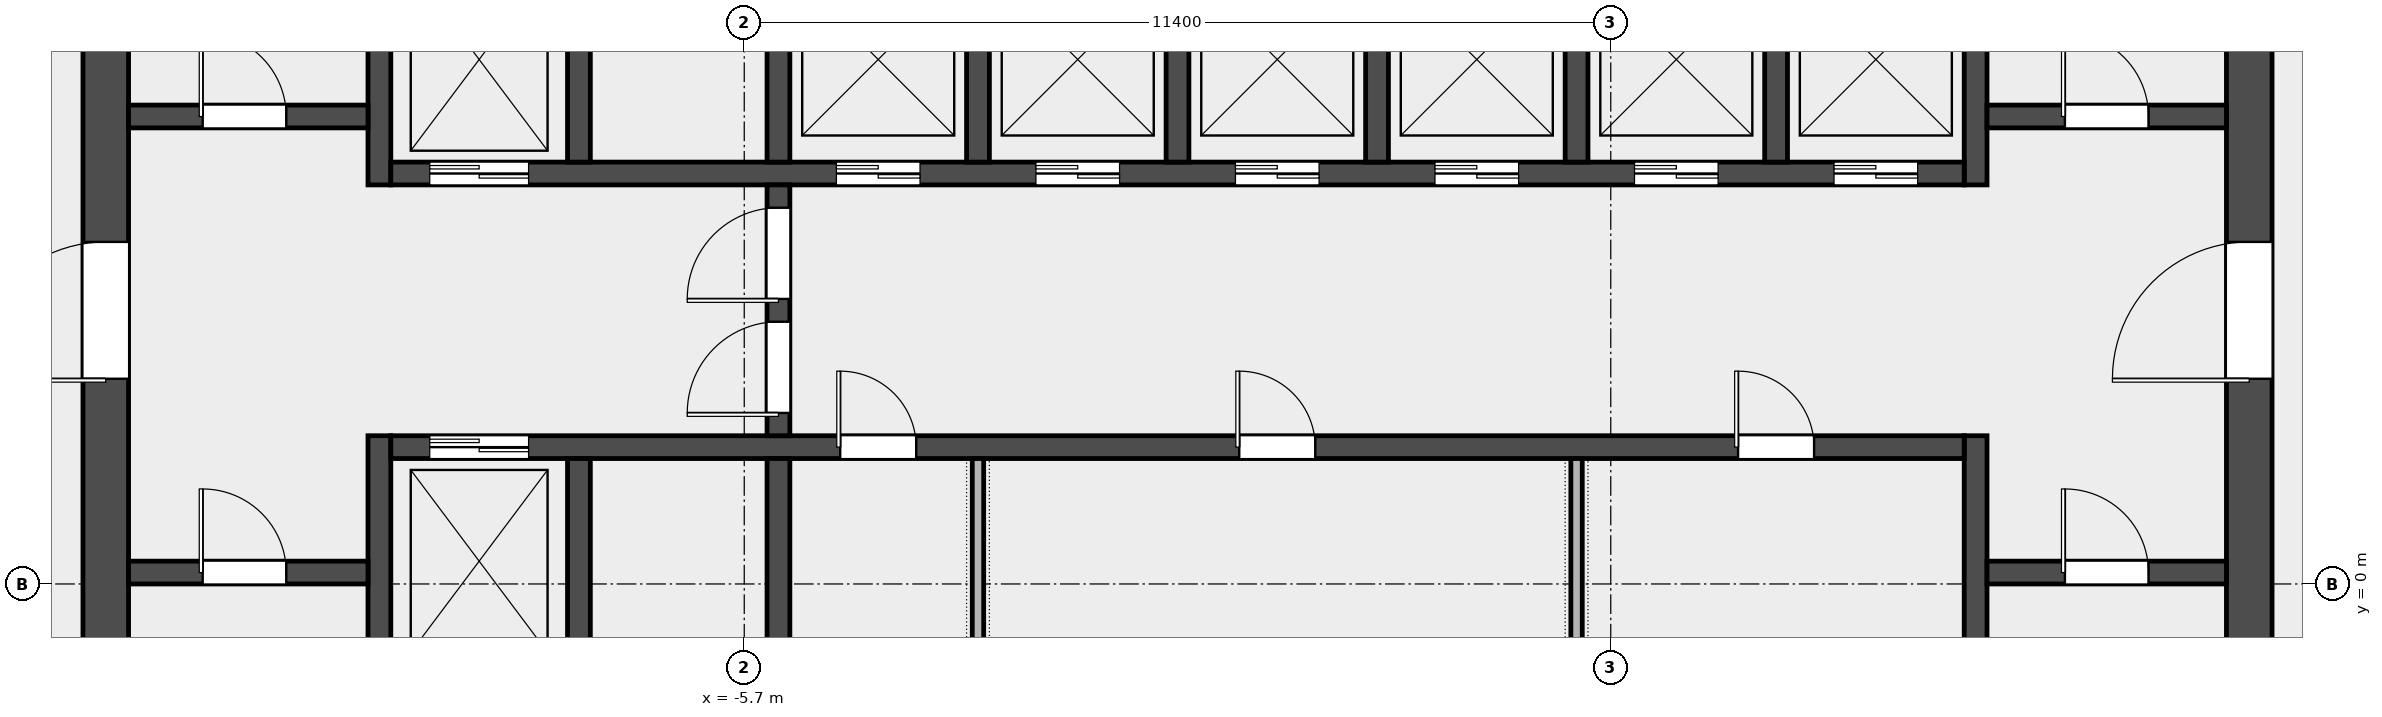
"""IFC4 building model, lengths in metres.
Left out: names, types, materials, properties, quantities, classifications, styles, units other than length and angle.
Written with IfcOpenShell. Run it as: python <this file> out.ifc"""

import sys

from ifc_helpers import new_model, si_unit, direction, frame, frame_2d, origin, place, context, subcontext, project, spatial, rectangle, extrude, element, fill, save


model = new_model("IFC4")
c1 = context("Model", 3, precision=1e-05, world=origin(), true_north=direction((0.0, 1.0)))
c2 = subcontext(c1, "Body", "Model", "MODEL_VIEW")
j1 = project(units=[si_unit("LENGTHUNIT", "METRE"), si_unit("PLANEANGLEUNIT", "RADIAN")], contexts=[c1])
p1 = place(None, origin())
s1 = spatial("IfcSite", under=j1, at=p1, CompositionType="ELEMENT")
p2 = place(p1, origin())
s2 = spatial("IfcBuilding", under=s1, at=p2, CompositionType="ELEMENT")
p3 = place(p2, frame((0.0, 0.0, 279.4)))
s3 = spatial("IfcBuildingStorey", under=s2, at=p3, CompositionType="ELEMENT", Elevation=279.4)
p4 = place(p3, frame((-14.1, -6.6, 0.0), z_axis=(0.0, 0.0, 1.0), x_axis=(0.0, 1.0, 0.0)))
e1 = element("IfcWall", 1, at=p4, inside=s3, PredefinedType="SHEAR", context=c2, shape_type="SweptSolid", body=[
    extrude(rectangle(XDim=19.5, YDim=0.6, at=frame_2d((9.75, 0.0))), origin(), (0.0, 0.0, 1.0), 3.7),
])
p5 = place(p4, frame((9.3, 0.0, 0.0)))
e2 = element("IfcOpeningElement", 2, at=p5, cuts=e1, PredefinedType="OPENING", context=c2, shape_type="SweptSolid", body=[
    extrude(rectangle(XDim=1.8, YDim=2.1, at=frame_2d((0.9, 1.05))), frame((0.0, 0.312, 0.0), z_axis=(0.0, -1.0, 0.0), x_axis=(1.0, 0.0, 0.0)), (0.0, 0.0, 1.0), 0.624),
])
p6 = place(p3, frame((14.1, -6.6, 0.0), z_axis=(0.0, 0.0, 1.0), x_axis=(0.0, 1.0, 0.0)))
e3 = element("IfcWall", 3, at=p6, inside=s3, PredefinedType="SHEAR", context=c2, shape_type="SweptSolid", body=[
    extrude(rectangle(XDim=19.5, YDim=0.6, at=frame_2d((9.75, 0.0))), origin(), (0.0, 0.0, 1.0), 3.7),
])
p7 = place(p6, frame((9.3, 0.0, 0.0)))
e4 = element("IfcOpeningElement", 4, at=p7, cuts=e3, PredefinedType="OPENING", context=c2, shape_type="SweptSolid", body=[
    extrude(rectangle(XDim=1.8, YDim=2.1, at=frame_2d((0.9, 1.05))), frame((0.0, 0.312, 0.0), z_axis=(0.0, -1.0, 0.0), x_axis=(1.0, 0.0, 0.0)), (0.0, 0.0, 1.0), 0.624),
])
p8 = place(p3, frame((-10.5, -6.6, 0.0), z_axis=(0.0, 0.0, 1.0), x_axis=(0.0, 1.0, 0.0)))
e5 = element("IfcWall", 5, at=p8, inside=s3, PredefinedType="SHEAR", context=c2, shape_type="SweptSolid", body=[
    extrude(rectangle(XDim=8.55, YDim=0.3, at=frame_2d((4.275, 0.0))), origin(), (0.0, 0.0, 1.0), 3.7),
])
p9 = place(p3, frame((-10.5, 5.25, 0.0), z_axis=(0.0, 0.0, 1.0), x_axis=(0.0, 1.0, 0.0)))
e6 = element("IfcWall", 6, at=p9, inside=s3, PredefinedType="SHEAR", context=c2, shape_type="SweptSolid", body=[
    extrude(rectangle(XDim=7.65, YDim=0.3, at=frame_2d((3.825, 0.0))), origin(), (0.0, 0.0, 1.0), 3.7),
])
p10 = place(p3, frame((10.5, -6.6, 0.0), z_axis=(0.0, 0.0, 1.0), x_axis=(0.0, 1.0, 0.0)))
e7 = element("IfcWall", 7, at=p10, inside=s3, PredefinedType="SHEAR", context=c2, shape_type="SweptSolid", body=[
    extrude(rectangle(XDim=8.55, YDim=0.3, at=frame_2d((4.275, 0.0))), origin(), (0.0, 0.0, 1.0), 3.7),
])
p11 = place(p3, frame((10.5, 5.25, 0.0), z_axis=(0.0, 0.0, 1.0), x_axis=(0.0, 1.0, 0.0)))
e8 = element("IfcWall", 8, at=p11, inside=s3, PredefinedType="SHEAR", context=c2, shape_type="SweptSolid", body=[
    extrude(rectangle(XDim=7.65, YDim=0.3, at=frame_2d((3.825, 0.0))), origin(), (0.0, 0.0, 1.0), 3.7),
])
p12 = place(p3, frame((-13.8, 0.15, 0.0), z_axis=(0.0, 0.0, 1.0), x_axis=(1.0, 0.0, 0.0)))
e9 = element("IfcWall", 9, at=p12, inside=s3, PredefinedType="SOLIDWALL", context=c2, shape_type="SweptSolid", body=[
    extrude(rectangle(XDim=3.15, YDim=0.3, at=frame_2d((1.575, 0.0))), origin(), (0.0, 0.0, 1.0), 3.7),
])
p13 = place(p12, frame((0.975, 0.0, 0.0)))
e10 = element("IfcOpeningElement", 10, at=p13, cuts=e9, PredefinedType="OPENING", context=c2, shape_type="SweptSolid", body=[
    extrude(rectangle(XDim=1.1, YDim=2.1, at=frame_2d((0.55, 1.05))), frame((0.0, 0.162, 0.0), z_axis=(0.0, -1.0, 0.0), x_axis=(1.0, 0.0, 0.0)), (0.0, 0.0, 1.0), 0.324),
])
p14 = place(p3, frame((-13.8, 6.15, 0.0), z_axis=(0.0, 0.0, 1.0), x_axis=(1.0, 0.0, 0.0)))
e11 = element("IfcWall", 11, at=p14, inside=s3, PredefinedType="SOLIDWALL", context=c2, shape_type="SweptSolid", body=[
    extrude(rectangle(XDim=3.15, YDim=0.3, at=frame_2d((1.575, 0.0))), origin(), (0.0, 0.0, 1.0), 3.7),
])
p15 = place(p14, frame((0.975, 0.0, 0.0)))
e12 = element("IfcOpeningElement", 12, at=p15, cuts=e11, PredefinedType="OPENING", context=c2, shape_type="SweptSolid", body=[
    extrude(rectangle(XDim=1.1, YDim=2.1, at=frame_2d((0.55, 1.05))), frame((0.0, 0.162, 0.0), z_axis=(0.0, -1.0, 0.0), x_axis=(1.0, 0.0, 0.0)), (0.0, 0.0, 1.0), 0.324),
])
p16 = place(p3, frame((10.65, 0.15, 0.0), z_axis=(0.0, 0.0, 1.0), x_axis=(1.0, 0.0, 0.0)))
e13 = element("IfcWall", 13, at=p16, inside=s3, PredefinedType="SOLIDWALL", context=c2, shape_type="SweptSolid", body=[
    extrude(rectangle(XDim=3.15, YDim=0.3, at=frame_2d((1.575, 0.0))), origin(), (0.0, 0.0, 1.0), 3.7),
])
p17 = place(p16, frame((1.025, 0.0, 0.0)))
e14 = element("IfcOpeningElement", 14, at=p17, cuts=e13, PredefinedType="OPENING", context=c2, shape_type="SweptSolid", body=[
    extrude(rectangle(XDim=1.1, YDim=2.1, at=frame_2d((0.55, 1.05))), frame((0.0, 0.162, 0.0), z_axis=(0.0, -1.0, 0.0), x_axis=(1.0, 0.0, 0.0)), (0.0, 0.0, 1.0), 0.324),
])
p18 = place(p3, frame((10.65, 6.15, 0.0), z_axis=(0.0, 0.0, 1.0), x_axis=(1.0, 0.0, 0.0)))
e15 = element("IfcWall", 15, at=p18, inside=s3, PredefinedType="SOLIDWALL", context=c2, shape_type="SweptSolid", body=[
    extrude(rectangle(XDim=3.15, YDim=0.3, at=frame_2d((1.575, 0.0))), origin(), (0.0, 0.0, 1.0), 3.7),
])
p19 = place(p18, frame((1.025, 0.0, 0.0)))
e16 = element("IfcOpeningElement", 16, at=p19, cuts=e15, PredefinedType="OPENING", context=c2, shape_type="SweptSolid", body=[
    extrude(rectangle(XDim=1.1, YDim=2.1, at=frame_2d((0.55, 1.05))), frame((0.0, 0.162, 0.0), z_axis=(0.0, -1.0, 0.0), x_axis=(1.0, 0.0, 0.0)), (0.0, 0.0, 1.0), 0.324),
])
p20 = place(p3, frame((-10.35, 1.8, 0.0), z_axis=(0.0, 0.0, 1.0), x_axis=(1.0, 0.0, 0.0)))
e17 = element("IfcWall", 17, at=p20, inside=s3, PredefinedType="SOLIDWALL", context=c2, shape_type="SweptSolid", body=[
    extrude(rectangle(XDim=20.7, YDim=0.3, at=frame_2d((10.35, 0.0))), origin(), (0.0, 0.0, 1.0), 3.7),
])
p21 = place(p20, frame((0.512, 0.0, 0.0)))
e18 = element("IfcOpeningElement", 18, at=p21, cuts=e17, PredefinedType="OPENING", context=c2, shape_type="SweptSolid", body=[
    extrude(rectangle(XDim=1.3, YDim=2.1, at=frame_2d((0.65, 1.05))), frame((0.0, 0.162, 0.0), z_axis=(0.0, -1.0, 0.0), x_axis=(1.0, 0.0, 0.0)), (0.0, 0.0, 1.0), 0.324),
])
p22 = place(p20, frame((5.913, 0.0, 0.0)))
e19 = element("IfcOpeningElement", 19, at=p22, cuts=e17, PredefinedType="OPENING", context=c2, shape_type="SweptSolid", body=[
    extrude(rectangle(XDim=1.0, YDim=2.1, at=frame_2d((0.5, 1.05))), frame((0.0, 0.162, 0.0), z_axis=(0.0, -1.0, 0.0), x_axis=(1.0, 0.0, 0.0)), (0.0, 0.0, 1.0), 0.324),
])
p23 = place(p20, frame((11.163, 0.0, 0.0)))
e20 = element("IfcOpeningElement", 20, at=p23, cuts=e17, PredefinedType="OPENING", context=c2, shape_type="SweptSolid", body=[
    extrude(rectangle(XDim=1.0, YDim=2.1, at=frame_2d((0.5, 1.05))), frame((0.0, 0.162, 0.0), z_axis=(0.0, -1.0, 0.0), x_axis=(1.0, 0.0, 0.0)), (0.0, 0.0, 1.0), 0.324),
])
p24 = place(p20, frame((17.725, 0.0, 0.0)))
e21 = element("IfcOpeningElement", 21, at=p24, cuts=e17, PredefinedType="OPENING", context=c2, shape_type="SweptSolid", body=[
    extrude(rectangle(XDim=1.0, YDim=2.1, at=frame_2d((0.5, 1.05))), frame((0.0, 0.162, 0.0), z_axis=(0.0, -1.0, 0.0), x_axis=(1.0, 0.0, 0.0)), (0.0, 0.0, 1.0), 0.324),
])
p25 = place(p3, frame((-10.35, 5.4, 0.0), z_axis=(0.0, 0.0, 1.0), x_axis=(1.0, 0.0, 0.0)))
e22 = element("IfcWall", 22, at=p25, inside=s3, PredefinedType="SOLIDWALL", context=c2, shape_type="SweptSolid", body=[
    extrude(rectangle(XDim=20.7, YDim=0.3, at=frame_2d((10.35, 0.0))), origin(), (0.0, 0.0, 1.0), 3.7),
])
p26 = place(p25, frame((0.512, 0.0, 0.0)))
e23 = element("IfcOpeningElement", 23, at=p26, cuts=e22, PredefinedType="OPENING", context=c2, shape_type="SweptSolid", body=[
    extrude(rectangle(XDim=1.3, YDim=2.1, at=frame_2d((0.65, 1.05))), frame((0.0, 0.162, 0.0), z_axis=(0.0, -1.0, 0.0), x_axis=(1.0, 0.0, 0.0)), (0.0, 0.0, 1.0), 0.324),
])
p27 = place(p25, frame((5.863, 0.0, 0.0)))
e24 = element("IfcOpeningElement", 24, at=p27, cuts=e22, PredefinedType="OPENING", context=c2, shape_type="SweptSolid", body=[
    extrude(rectangle(XDim=1.1, YDim=2.1, at=frame_2d((0.55, 1.05))), frame((0.0, 0.162, 0.0), z_axis=(0.0, -1.0, 0.0), x_axis=(1.0, 0.0, 0.0)), (0.0, 0.0, 1.0), 0.324),
])
p28 = place(p25, frame((8.488, 0.0, 0.0)))
e25 = element("IfcOpeningElement", 25, at=p28, cuts=e22, PredefinedType="OPENING", context=c2, shape_type="SweptSolid", body=[
    extrude(rectangle(XDim=1.1, YDim=2.1, at=frame_2d((0.55, 1.05))), frame((0.0, 0.162, 0.0), z_axis=(0.0, -1.0, 0.0), x_axis=(1.0, 0.0, 0.0)), (0.0, 0.0, 1.0), 0.324),
])
p29 = place(p25, frame((11.113, 0.0, 0.0)))
e26 = element("IfcOpeningElement", 26, at=p29, cuts=e22, PredefinedType="OPENING", context=c2, shape_type="SweptSolid", body=[
    extrude(rectangle(XDim=1.1, YDim=2.1, at=frame_2d((0.55, 1.05))), frame((0.0, 0.162, 0.0), z_axis=(0.0, -1.0, 0.0), x_axis=(1.0, 0.0, 0.0)), (0.0, 0.0, 1.0), 0.324),
])
p30 = place(p25, frame((13.738, 0.0, 0.0)))
e27 = element("IfcOpeningElement", 27, at=p30, cuts=e22, PredefinedType="OPENING", context=c2, shape_type="SweptSolid", body=[
    extrude(rectangle(XDim=1.1, YDim=2.1, at=frame_2d((0.55, 1.05))), frame((0.0, 0.162, 0.0), z_axis=(0.0, -1.0, 0.0), x_axis=(1.0, 0.0, 0.0)), (0.0, 0.0, 1.0), 0.324),
])
p31 = place(p25, frame((16.363, 0.0, 0.0)))
e28 = element("IfcOpeningElement", 28, at=p31, cuts=e22, PredefinedType="OPENING", context=c2, shape_type="SweptSolid", body=[
    extrude(rectangle(XDim=1.1, YDim=2.1, at=frame_2d((0.55, 1.05))), frame((0.0, 0.162, 0.0), z_axis=(0.0, -1.0, 0.0), x_axis=(1.0, 0.0, 0.0)), (0.0, 0.0, 1.0), 0.324),
])
p32 = place(p25, frame((18.988, 0.0, 0.0)))
e29 = element("IfcOpeningElement", 29, at=p32, cuts=e22, PredefinedType="OPENING", context=c2, shape_type="SweptSolid", body=[
    extrude(rectangle(XDim=1.1, YDim=2.1, at=frame_2d((0.55, 1.05))), frame((0.0, 0.162, 0.0), z_axis=(0.0, -1.0, 0.0), x_axis=(1.0, 0.0, 0.0)), (0.0, 0.0, 1.0), 0.324),
])
for number, where, z_axis, x_axis in (
    (30, (-7.875, -1.05, 0.0), (0.0, 0.0, 1.0), (0.0, 1.0, 0.0)),
    (31, (-5.25, -1.05, 0.0), (0.0, 0.0, 1.0), (0.0, 1.0, 0.0)),
    (32, (-7.875, 5.55, 0.0), (0.0, 0.0, 1.0), (0.0, 1.0, 0.0)),
    (33, (-5.25, 5.55, 0.0), (0.0, 0.0, 1.0), (0.0, 1.0, 0.0)),
    (34, (-2.625, 5.55, 0.0), (0.0, 0.0, 1.0), (0.0, 1.0, 0.0)),
    (35, (0.0, 5.55, 0.0), (0.0, 0.0, 1.0), (0.0, 1.0, 0.0)),
    (36, (2.625, 5.55, 0.0), (0.0, 0.0, 1.0), (0.0, 1.0, 0.0)),
    (37, (5.25, 5.55, 0.0), (0.0, 0.0, 1.0), (0.0, 1.0, 0.0)),
    (38, (7.875, 5.55, 0.0), (0.0, 0.0, 1.0), (0.0, 1.0, 0.0)),
):
    element("IfcWall", number, at=place(p3, frame(where, z_axis=z_axis, x_axis=x_axis)), inside=s3, PredefinedType="SOLIDWALL", context=c2, shape_type="SweptSolid", body=[
        extrude(rectangle(XDim=2.7, YDim=0.3, at=frame_2d((1.35, 0.0))), origin(), (0.0, 0.0, 1.0), 3.7),
    ])
p33 = place(p3, frame((-5.25, 1.95, 0.0), z_axis=(0.0, 0.0, 1.0), x_axis=(0.0, 1.0, 0.0)))
e39 = element("IfcWall", 39, at=p33, inside=s3, PredefinedType="SOLIDWALL", context=c2, shape_type="SweptSolid", body=[
    extrude(rectangle(XDim=3.3, YDim=0.3, at=frame_2d((1.65, 0.0))), origin(), (0.0, 0.0, 1.0), 3.7),
])
p34 = place(p33, frame((0.3, 0.0, 0.0)))
e40 = element("IfcOpeningElement", 40, at=p34, cuts=e39, PredefinedType="OPENING", context=c2, shape_type="SweptSolid", body=[
    extrude(rectangle(XDim=1.2, YDim=2.1, at=frame_2d((0.6, 1.05))), frame((0.0, 0.162, 0.0), z_axis=(0.0, -1.0, 0.0), x_axis=(1.0, 0.0, 0.0)), (0.0, 0.0, 1.0), 0.324),
])
p35 = place(p33, frame((1.8, 0.0, 0.0)))
e41 = element("IfcOpeningElement", 41, at=p35, cuts=e39, PredefinedType="OPENING", context=c2, shape_type="SweptSolid", body=[
    extrude(rectangle(XDim=1.2, YDim=2.1, at=frame_2d((0.6, 1.05))), frame((0.0, 0.162, 0.0), z_axis=(0.0, -1.0, 0.0), x_axis=(1.0, 0.0, 0.0)), (0.0, 0.0, 1.0), 0.324),
])
for number, where, z_axis, x_axis in (
    (42, (-2.625, -1.05, 0.0), (0.0, 0.0, 1.0), (0.0, 1.0, 0.0)),
    (43, (5.25, -1.05, 0.0), (0.0, 0.0, 1.0), (0.0, 1.0, 0.0)),
):
    element("IfcWall", number, at=place(p3, frame(where, z_axis=z_axis, x_axis=x_axis)), inside=s3, PredefinedType="PARTITIONING", context=c2, shape_type="SweptSolid", body=[
        extrude(rectangle(XDim=2.7, YDim=0.15, at=frame_2d((1.35, 0.0))), origin(), (0.0, 0.0, 1.0), 3.7),
    ])
p36 = place(p13, origin())
e44 = element("IfcDoor", 44, at=p36, inside=s3, OperationType="SINGLE_SWING_LEFT", PredefinedType="DOOR", context=c2, shape_type="SweptSolid", body=[
    extrude(rectangle(XDim=1.1, YDim=2.1, at=frame_2d((0.55, 1.05))), frame((0.0, 0.025, 0.0), z_axis=(0.0, -1.0, 0.0), x_axis=(1.0, 0.0, 0.0)), (0.0, 0.0, 1.0), 0.05),
])
fill(e10, e44)
p37 = place(p15, origin())
e45 = element("IfcDoor", 45, at=p37, inside=s3, OperationType="SINGLE_SWING_LEFT", PredefinedType="DOOR", context=c2, shape_type="SweptSolid", body=[
    extrude(rectangle(XDim=1.1, YDim=2.1, at=frame_2d((0.55, 1.05))), frame((0.0, 0.025, 0.0), z_axis=(0.0, -1.0, 0.0), x_axis=(1.0, 0.0, 0.0)), (0.0, 0.0, 1.0), 0.05),
])
fill(e12, e45)
p38 = place(p17, origin())
e46 = element("IfcDoor", 46, at=p38, inside=s3, OperationType="SINGLE_SWING_RIGHT", PredefinedType="DOOR", context=c2, shape_type="SweptSolid", body=[
    extrude(rectangle(XDim=1.1, YDim=2.1, at=frame_2d((0.55, 1.05))), frame((0.0, 0.025, 0.0), z_axis=(0.0, -1.0, 0.0), x_axis=(1.0, 0.0, 0.0)), (0.0, 0.0, 1.0), 0.05),
])
fill(e14, e46)
p39 = place(p19, origin())
e47 = element("IfcDoor", 47, at=p39, inside=s3, OperationType="SINGLE_SWING_RIGHT", PredefinedType="DOOR", context=c2, shape_type="SweptSolid", body=[
    extrude(rectangle(XDim=1.1, YDim=2.1, at=frame_2d((0.55, 1.05))), frame((0.0, 0.025, 0.0), z_axis=(0.0, -1.0, 0.0), x_axis=(1.0, 0.0, 0.0)), (0.0, 0.0, 1.0), 0.05),
])
fill(e16, e47)
p40 = place(p5, origin())
e48 = element("IfcDoor", 48, at=p40, inside=s3, OperationType="DOUBLE_DOOR_SINGLE_SWING", PredefinedType="DOOR", context=c2, shape_type="SweptSolid", body=[
    extrude(rectangle(XDim=1.8, YDim=2.1, at=frame_2d((0.9, 1.05))), frame((0.0, 0.025, 0.0), z_axis=(0.0, -1.0, 0.0), x_axis=(1.0, 0.0, 0.0)), (0.0, 0.0, 1.0), 0.05),
])
fill(e2, e48)
p41 = place(p7, origin())
e49 = element("IfcDoor", 49, at=p41, inside=s3, OperationType="DOUBLE_DOOR_SINGLE_SWING", PredefinedType="DOOR", context=c2, shape_type="SweptSolid", body=[
    extrude(rectangle(XDim=1.8, YDim=2.1, at=frame_2d((0.9, 1.05))), frame((0.0, 0.025, 0.0), z_axis=(0.0, -1.0, 0.0), x_axis=(1.0, 0.0, 0.0)), (0.0, 0.0, 1.0), 0.05),
])
fill(e4, e49)
p42 = place(p34, origin())
e50 = element("IfcDoor", 50, at=p42, inside=s3, OperationType="SINGLE_SWING_LEFT", PredefinedType="DOOR", context=c2, shape_type="SweptSolid", body=[
    extrude(rectangle(XDim=1.2, YDim=2.1, at=frame_2d((0.6, 1.05))), frame((0.0, 0.025, 0.0), z_axis=(0.0, -1.0, 0.0), x_axis=(1.0, 0.0, 0.0)), (0.0, 0.0, 1.0), 0.05),
])
fill(e40, e50)
p43 = place(p35, origin())
e51 = element("IfcDoor", 51, at=p43, inside=s3, OperationType="SINGLE_SWING_RIGHT", PredefinedType="DOOR", context=c2, shape_type="SweptSolid", body=[
    extrude(rectangle(XDim=1.2, YDim=2.1, at=frame_2d((0.6, 1.05))), frame((0.0, 0.025, 0.0), z_axis=(0.0, -1.0, 0.0), x_axis=(1.0, 0.0, 0.0)), (0.0, 0.0, 1.0), 0.05),
])
fill(e41, e51)
p44 = place(p21, origin())
e52 = element("IfcDoor", 52, at=p44, inside=s3, OperationType="DOUBLE_DOOR_SLIDING", PredefinedType="DOOR", context=c2, shape_type="SweptSolid", body=[
    extrude(rectangle(XDim=1.3, YDim=2.1, at=frame_2d((0.65, 1.05))), frame((0.0, 0.025, 0.0), z_axis=(0.0, -1.0, 0.0), x_axis=(1.0, 0.0, 0.0)), (0.0, 0.0, 1.0), 0.05),
])
fill(e18, e52)
p45 = place(p26, origin())
e53 = element("IfcDoor", 53, at=p45, inside=s3, OperationType="DOUBLE_DOOR_SLIDING", PredefinedType="DOOR", context=c2, shape_type="SweptSolid", body=[
    extrude(rectangle(XDim=1.3, YDim=2.1, at=frame_2d((0.65, 1.05))), frame((0.0, 0.025, 0.0), z_axis=(0.0, -1.0, 0.0), x_axis=(1.0, 0.0, 0.0)), (0.0, 0.0, 1.0), 0.05),
])
fill(e23, e53)
p46 = place(p27, origin())
e54 = element("IfcDoor", 54, at=p46, inside=s3, OperationType="DOUBLE_DOOR_SLIDING", PredefinedType="DOOR", context=c2, shape_type="SweptSolid", body=[
    extrude(rectangle(XDim=1.1, YDim=2.1, at=frame_2d((0.55, 1.05))), frame((0.0, 0.025, 0.0), z_axis=(0.0, -1.0, 0.0), x_axis=(1.0, 0.0, 0.0)), (0.0, 0.0, 1.0), 0.05),
])
fill(e24, e54)
p47 = place(p28, origin())
e55 = element("IfcDoor", 55, at=p47, inside=s3, OperationType="DOUBLE_DOOR_SLIDING", PredefinedType="DOOR", context=c2, shape_type="SweptSolid", body=[
    extrude(rectangle(XDim=1.1, YDim=2.1, at=frame_2d((0.55, 1.05))), frame((0.0, 0.025, 0.0), z_axis=(0.0, -1.0, 0.0), x_axis=(1.0, 0.0, 0.0)), (0.0, 0.0, 1.0), 0.05),
])
fill(e25, e55)
p48 = place(p29, origin())
e56 = element("IfcDoor", 56, at=p48, inside=s3, OperationType="DOUBLE_DOOR_SLIDING", PredefinedType="DOOR", context=c2, shape_type="SweptSolid", body=[
    extrude(rectangle(XDim=1.1, YDim=2.1, at=frame_2d((0.55, 1.05))), frame((0.0, 0.025, 0.0), z_axis=(0.0, -1.0, 0.0), x_axis=(1.0, 0.0, 0.0)), (0.0, 0.0, 1.0), 0.05),
])
fill(e26, e56)
p49 = place(p30, origin())
e57 = element("IfcDoor", 57, at=p49, inside=s3, OperationType="DOUBLE_DOOR_SLIDING", PredefinedType="DOOR", context=c2, shape_type="SweptSolid", body=[
    extrude(rectangle(XDim=1.1, YDim=2.1, at=frame_2d((0.55, 1.05))), frame((0.0, 0.025, 0.0), z_axis=(0.0, -1.0, 0.0), x_axis=(1.0, 0.0, 0.0)), (0.0, 0.0, 1.0), 0.05),
])
fill(e27, e57)
p50 = place(p31, origin())
e58 = element("IfcDoor", 58, at=p50, inside=s3, OperationType="DOUBLE_DOOR_SLIDING", PredefinedType="DOOR", context=c2, shape_type="SweptSolid", body=[
    extrude(rectangle(XDim=1.1, YDim=2.1, at=frame_2d((0.55, 1.05))), frame((0.0, 0.025, 0.0), z_axis=(0.0, -1.0, 0.0), x_axis=(1.0, 0.0, 0.0)), (0.0, 0.0, 1.0), 0.05),
])
fill(e28, e58)
p51 = place(p32, origin())
e59 = element("IfcDoor", 59, at=p51, inside=s3, OperationType="DOUBLE_DOOR_SLIDING", PredefinedType="DOOR", context=c2, shape_type="SweptSolid", body=[
    extrude(rectangle(XDim=1.1, YDim=2.1, at=frame_2d((0.55, 1.05))), frame((0.0, 0.025, 0.0), z_axis=(0.0, -1.0, 0.0), x_axis=(1.0, 0.0, 0.0)), (0.0, 0.0, 1.0), 0.05),
])
fill(e29, e59)
p52 = place(p22, origin())
e60 = element("IfcDoor", 60, at=p52, inside=s3, OperationType="SINGLE_SWING_LEFT", PredefinedType="DOOR", context=c2, shape_type="SweptSolid", body=[
    extrude(rectangle(XDim=1.0, YDim=2.1, at=frame_2d((0.5, 1.05))), frame((0.0, 0.025, 0.0), z_axis=(0.0, -1.0, 0.0), x_axis=(1.0, 0.0, 0.0)), (0.0, 0.0, 1.0), 0.05),
])
fill(e19, e60)
p53 = place(p23, origin())
e61 = element("IfcDoor", 61, at=p53, inside=s3, OperationType="SINGLE_SWING_LEFT", PredefinedType="DOOR", context=c2, shape_type="SweptSolid", body=[
    extrude(rectangle(XDim=1.0, YDim=2.1, at=frame_2d((0.5, 1.05))), frame((0.0, 0.025, 0.0), z_axis=(0.0, -1.0, 0.0), x_axis=(1.0, 0.0, 0.0)), (0.0, 0.0, 1.0), 0.05),
])
fill(e20, e61)
p54 = place(p24, origin())
e62 = element("IfcDoor", 62, at=p54, inside=s3, OperationType="SINGLE_SWING_LEFT", PredefinedType="DOOR", context=c2, shape_type="SweptSolid", body=[
    extrude(rectangle(XDim=1.0, YDim=2.1, at=frame_2d((0.5, 1.05))), frame((0.0, 0.025, 0.0), z_axis=(0.0, -1.0, 0.0), x_axis=(1.0, 0.0, 0.0)), (0.0, 0.0, 1.0), 0.05),
])
fill(e21, e62)
save(model, sys.argv[1])
